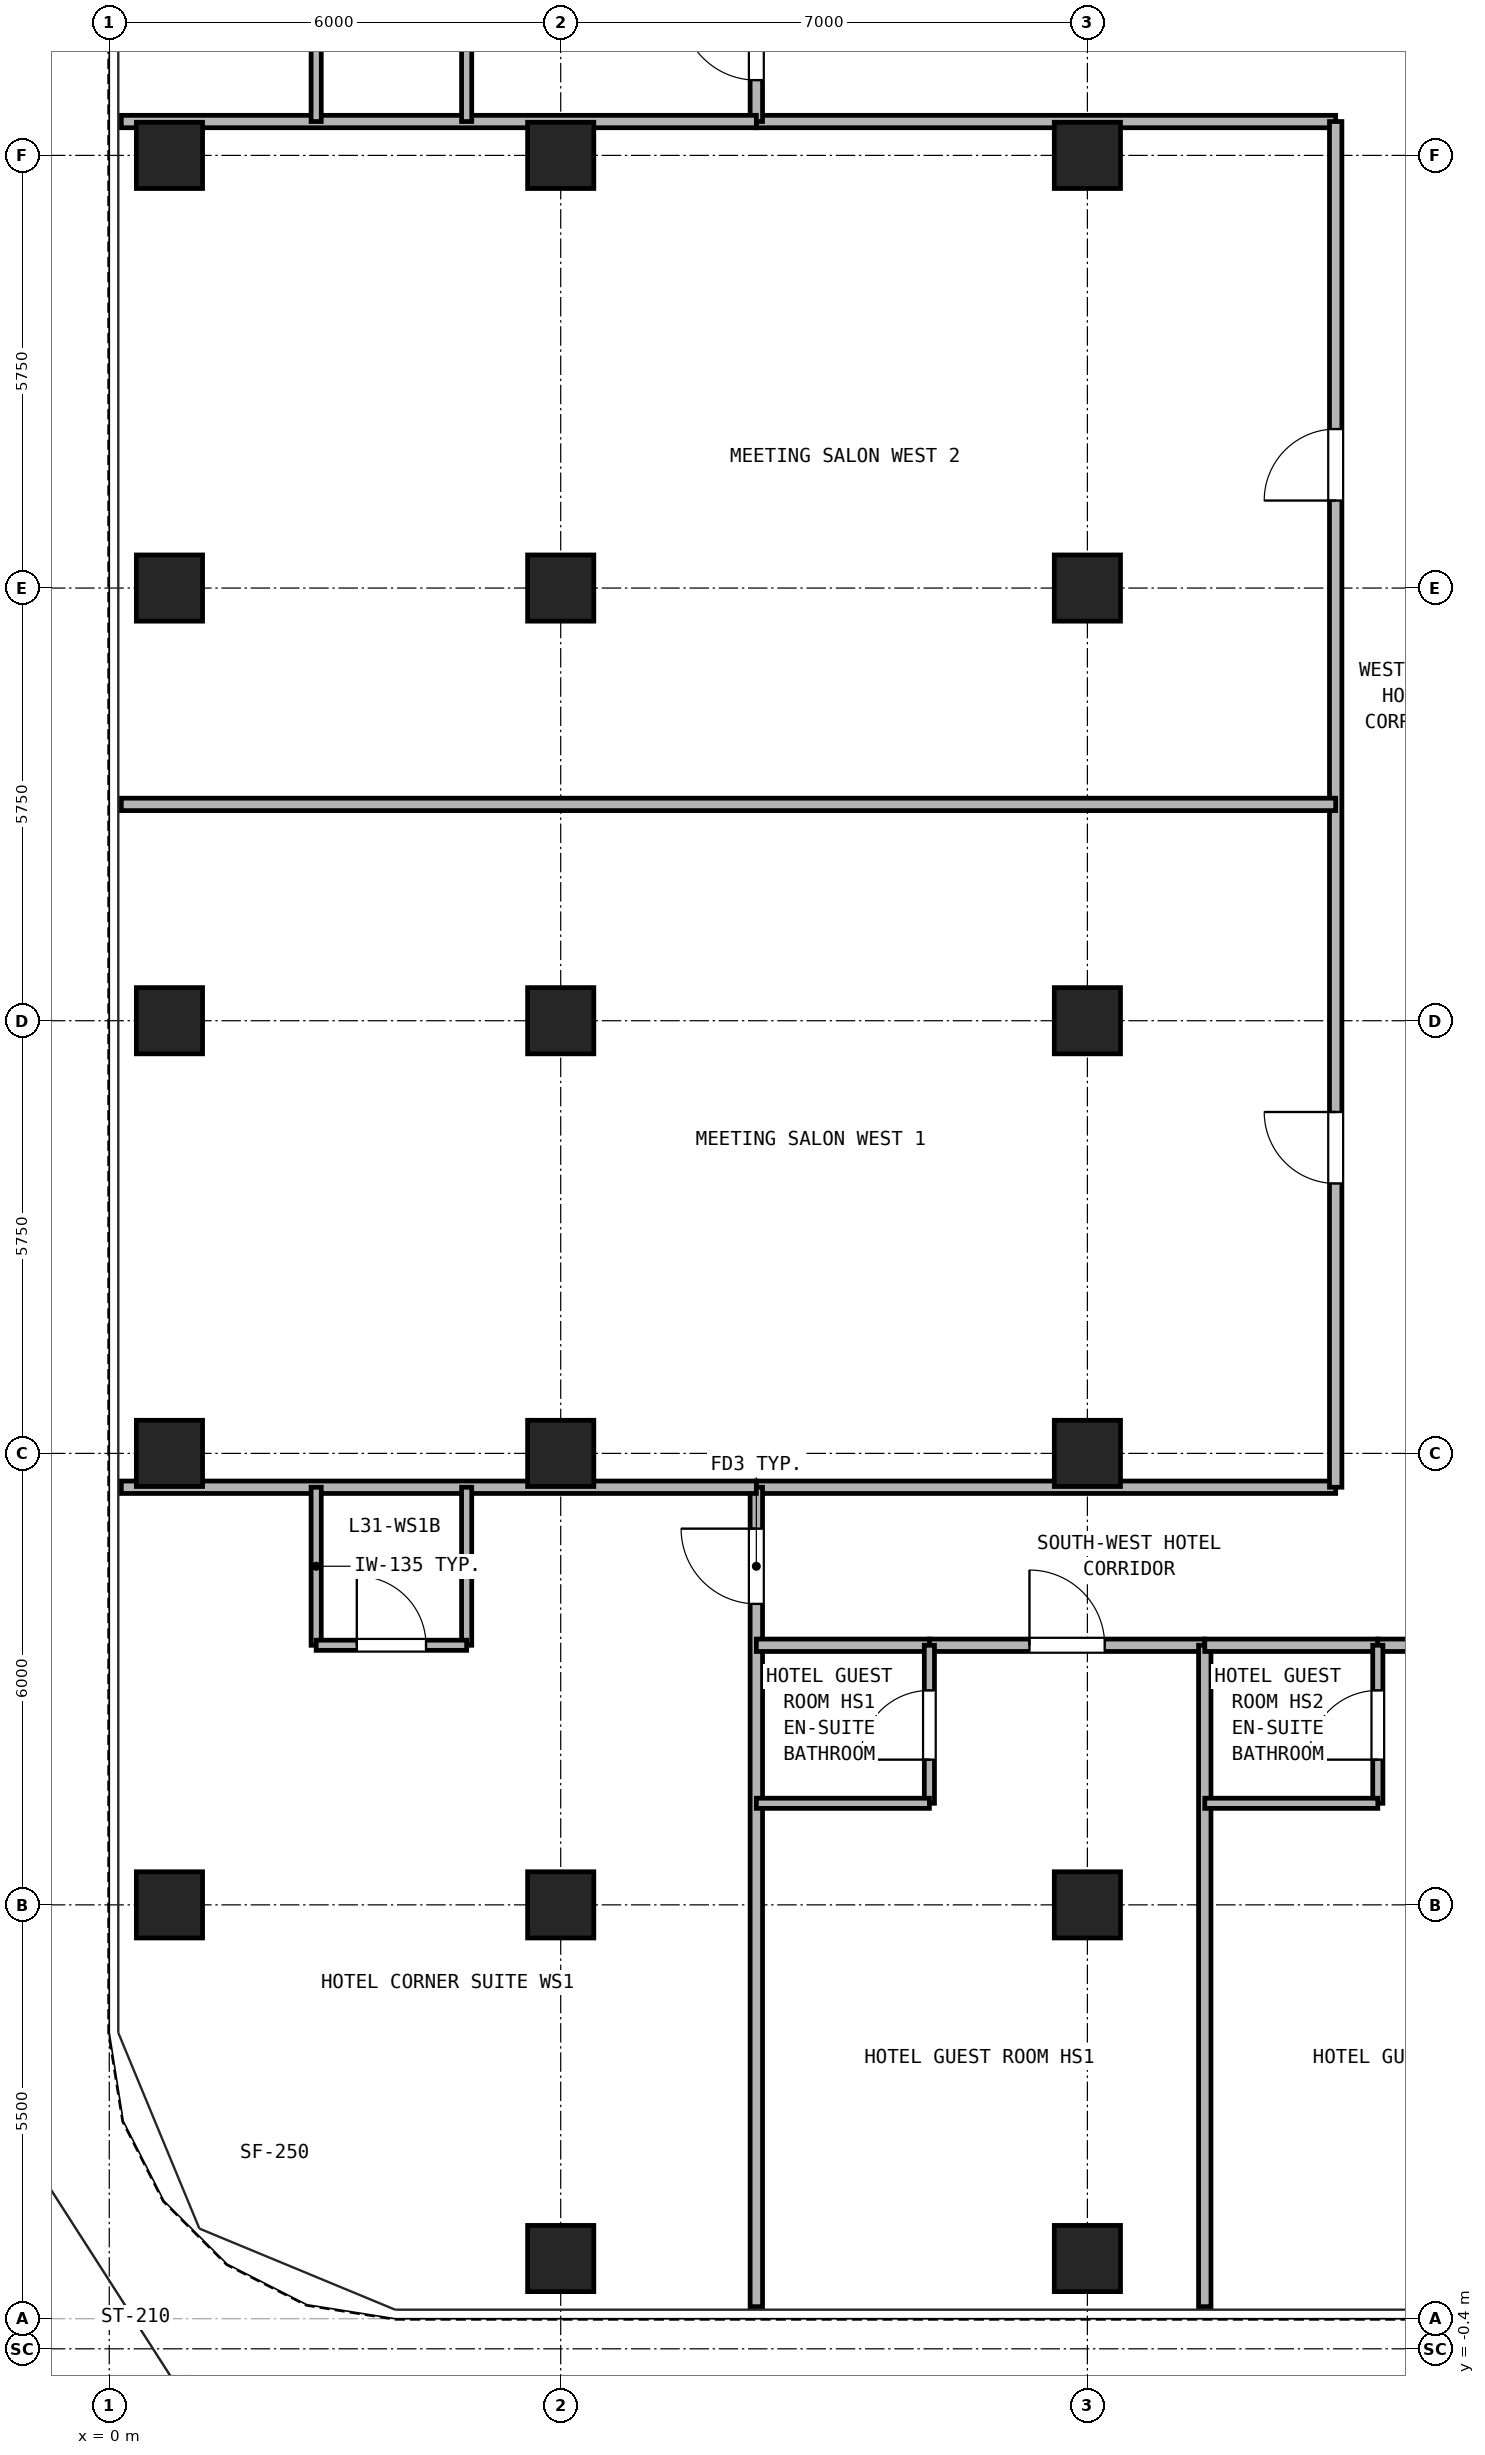
"""IFC4 building model, lengths in metres.
Left out: names, types, materials, properties, quantities, classifications, styles, units other than length and angle.
Written with IfcOpenShell. Run it as: python <this file> out.ifc"""

import sys

from ifc_helpers import new_model, si_unit, direction, frame, frame_2d, origin, origin_2d, place, context, subcontext, project, spatial, rectangle, hollow_rectangle, extrude, source, transform, mapped, element, fill, save


model = new_model("IFC4")
c1 = context("Model", 3, precision=1e-05, world=origin(), true_north=direction((0.0, 1.0)))
c2 = subcontext(c1, "Body", "Model", "MODEL_VIEW")
j1 = project(units=[si_unit("LENGTHUNIT", "METRE"), si_unit("PLANEANGLEUNIT", "RADIAN")], contexts=[c1])
p1 = place(None, origin())
s1 = spatial("IfcSite", under=j1, at=p1, CompositionType="ELEMENT")
p2 = place(p1, origin())
s2 = spatial("IfcBuilding", under=s1, at=p2, CompositionType="ELEMENT")
p3 = place(p2, frame((0.0, 0.0, 115.1)))
s3 = spatial("IfcBuildingStorey", under=s2, at=p3, CompositionType="ELEMENT", Elevation=115.1)
m1 = source(origin(), c2, "Body", "SweptSolid", [
    extrude(hollow_rectangle(XDim=0.88, YDim=0.88, WallThickness=0.05, at=origin_2d()), origin(), (0.0, 0.0, 1.0), 2.95),
])
for number, where, z_axis, x_axis in (
    (1, (6.0, 0.8, 0.0), (0.0, 0.0, 1.0), (1.0, 0.0, 0.0)),
    (2, (13.0, 0.8, 0.0), (0.0, 0.0, 1.0), (1.0, 0.0, 0.0)),
    (3, (0.8, 5.5, 0.0), (0.0, 0.0, 1.0), (1.0, 0.0, 0.0)),
    (4, (0.8, 11.5, 0.0), (0.0, 0.0, 1.0), (1.0, 0.0, 0.0)),
    (5, (0.8, 17.25, 0.0), (0.0, 0.0, 1.0), (1.0, 0.0, 0.0)),
    (6, (0.8, 23.0, 0.0), (0.0, 0.0, 1.0), (1.0, 0.0, 0.0)),
    (7, (0.8, 28.75, 0.0), (0.0, 0.0, 1.0), (1.0, 0.0, 0.0)),
    (8, (6.0, 5.5, 0.0), (0.0, 0.0, 1.0), (1.0, 0.0, 0.0)),
    (9, (6.0, 11.5, 0.0), (0.0, 0.0, 1.0), (1.0, 0.0, 0.0)),
    (10, (6.0, 17.25, 0.0), (0.0, 0.0, 1.0), (1.0, 0.0, 0.0)),
    (11, (6.0, 23.0, 0.0), (0.0, 0.0, 1.0), (1.0, 0.0, 0.0)),
    (12, (6.0, 28.75, 0.0), (0.0, 0.0, 1.0), (1.0, 0.0, 0.0)),
    (13, (13.0, 5.5, 0.0), (0.0, 0.0, 1.0), (1.0, 0.0, 0.0)),
    (14, (13.0, 11.5, 0.0), (0.0, 0.0, 1.0), (1.0, 0.0, 0.0)),
    (15, (13.0, 17.25, 0.0), (0.0, 0.0, 1.0), (1.0, 0.0, 0.0)),
    (16, (13.0, 23.0, 0.0), (0.0, 0.0, 1.0), (1.0, 0.0, 0.0)),
    (17, (13.0, 28.75, 0.0), (0.0, 0.0, 1.0), (1.0, 0.0, 0.0)),
):
    element("IfcColumn", number, at=place(p3, frame(where, z_axis=z_axis, x_axis=x_axis)), inside=s3, PredefinedType="COLUMN", context=c2, shape_type="MappedRepresentation", body=[
        mapped(m1, transform((0.0, 0.0, 0.0), x_axis=(1.0, 0.0, 0.0), y_axis=(0.0, 1.0, 0.0), z_axis=(0.0, 0.0, 1.0), scale=1.0)),
    ])
for number, where, z_axis, x_axis in (
    (18, (8.6, 11.05, 0.0), (0.0, 0.0, 1.0), (1.0, 0.0, 0.0)),
    (19, (8.6, 29.2, 0.0), (0.0, 0.0, 1.0), (1.0, 0.0, 0.0)),
):
    element("IfcWall", number, at=place(p3, frame(where, z_axis=z_axis, x_axis=x_axis)), inside=s3, PredefinedType="PARTITIONING", context=c2, shape_type="SweptSolid", body=[
        extrude(rectangle(XDim=7.7, YDim=0.165, at=frame_2d((3.85, 0.0))), origin(), (0.0, 0.0, 1.0), 2.95),
    ])
p4 = place(p3, frame((16.3, 11.05, 0.0), z_axis=(0.0, 0.0, 1.0), x_axis=(0.0, 1.0, 0.0)))
e20 = element("IfcWall", 20, at=p4, inside=s3, PredefinedType="PARTITIONING", context=c2, shape_type="SweptSolid", body=[
    extrude(rectangle(XDim=18.15, YDim=0.165, at=frame_2d((9.075, 0.0))), origin(), (0.0, 0.0, 1.0), 2.95),
])
p5 = place(p4, frame((4.037, 0.0, 0.0)))
e21 = element("IfcOpeningElement", 21, at=p5, cuts=e20, PredefinedType="OPENING", context=c2, shape_type="SweptSolid", body=[
    extrude(rectangle(XDim=0.95, YDim=2.15, at=frame_2d((0.475, 1.075))), frame((0.0, 0.093, 0.0), z_axis=(0.0, -1.0, 0.0), x_axis=(1.0, 0.0, 0.0)), (0.0, 0.0, 1.0), 0.185),
])
p6 = place(p4, frame((13.113, 0.0, 0.0)))
e22 = element("IfcOpeningElement", 22, at=p6, cuts=e20, PredefinedType="OPENING", context=c2, shape_type="SweptSolid", body=[
    extrude(rectangle(XDim=0.95, YDim=2.15, at=frame_2d((0.475, 1.075))), frame((0.0, 0.093, 0.0), z_axis=(0.0, -1.0, 0.0), x_axis=(1.0, 0.0, 0.0)), (0.0, 0.0, 1.0), 0.185),
])
p7 = place(p3, frame((8.6, 0.16, 0.0), z_axis=(0.0, 0.0, 1.0), x_axis=(0.0, 1.0, 0.0)))
e23 = element("IfcWall", 23, at=p7, inside=s3, PredefinedType="PARTITIONING", context=c2, shape_type="SweptSolid", body=[
    extrude(rectangle(XDim=10.89, YDim=0.165, at=frame_2d((5.445, 0.0))), origin(), (0.0, 0.0, 1.0), 2.95),
])
p8 = place(p7, frame((9.34, 0.0, 0.0)))
e24 = element("IfcOpeningElement", 24, at=p8, cuts=e23, PredefinedType="OPENING", context=c2, shape_type="SweptSolid", body=[
    extrude(rectangle(XDim=1.0, YDim=2.15, at=frame_2d((0.5, 1.075))), frame((0.0, 0.093, 0.0), z_axis=(0.0, -1.0, 0.0), x_axis=(1.0, 0.0, 0.0)), (0.0, 0.0, 1.0), 0.185),
])
p9 = place(p3, frame((8.6, 29.2, 0.0), z_axis=(0.0, 0.0, 1.0), x_axis=(0.0, 1.0, 0.0)))
e25 = element("IfcWall", 25, at=p9, inside=s3, PredefinedType="PARTITIONING", context=c2, shape_type="SweptSolid", body=[
    extrude(rectangle(XDim=5.94, YDim=0.165, at=frame_2d((2.97, 0.0))), origin(), (0.0, 0.0, 1.0), 2.95),
])
p10 = place(p9, frame((0.55, 0.0, 0.0)))
e26 = element("IfcOpeningElement", 26, at=p10, cuts=e25, PredefinedType="OPENING", context=c2, shape_type="SweptSolid", body=[
    extrude(rectangle(XDim=1.0, YDim=2.15, at=frame_2d((0.5, 1.075))), frame((0.0, 0.093, 0.0), z_axis=(0.0, -1.0, 0.0), x_axis=(1.0, 0.0, 0.0)), (0.0, 0.0, 1.0), 0.185),
])
for number, where, z_axis, x_axis in (
    (27, (0.16, 11.05, 0.0), (0.0, 0.0, 1.0), (1.0, 0.0, 0.0)),
    (28, (0.16, 29.2, 0.0), (0.0, 0.0, 1.0), (1.0, 0.0, 0.0)),
):
    element("IfcWall", number, at=place(p3, frame(where, z_axis=z_axis, x_axis=x_axis)), inside=s3, PredefinedType="PARTITIONING", context=c2, shape_type="SweptSolid", body=[
        extrude(rectangle(XDim=8.44, YDim=0.165, at=frame_2d((4.22, 0.0))), origin(), (0.0, 0.0, 1.0), 2.95),
    ])
for number, where, z_axis, x_axis in (
    (29, (2.75, 8.95, 0.0), (0.0, 0.0, 1.0), (0.0, 1.0, 0.0)),
    (30, (4.75, 8.95, 0.0), (0.0, 0.0, 1.0), (0.0, 1.0, 0.0)),
):
    element("IfcWall", number, at=place(p3, frame(where, z_axis=z_axis, x_axis=x_axis)), inside=s3, PredefinedType="PARTITIONING", context=c2, shape_type="SweptSolid", body=[
        extrude(rectangle(XDim=2.1, YDim=0.135, at=frame_2d((1.05, 0.0))), origin(), (0.0, 0.0, 1.0), 2.95),
    ])
p11 = place(p3, frame((2.75, 8.95, 0.0), z_axis=(0.0, 0.0, 1.0), x_axis=(1.0, 0.0, 0.0)))
e31 = element("IfcWall", 31, at=p11, inside=s3, PredefinedType="PARTITIONING", context=c2, shape_type="SweptSolid", body=[
    extrude(rectangle(XDim=2.0, YDim=0.135, at=frame_2d((1.0, 0.0))), origin(), (0.0, 0.0, 1.0), 2.95),
])
p12 = place(p11, frame((0.54, 0.0, 0.0)))
e32 = element("IfcOpeningElement", 32, at=p12, cuts=e31, PredefinedType="OPENING", context=c2, shape_type="SweptSolid", body=[
    extrude(rectangle(XDim=0.92, YDim=2.1, at=frame_2d((0.46, 1.05))), frame((0.0, 0.077, 0.0), z_axis=(0.0, -1.0, 0.0), x_axis=(1.0, 0.0, 0.0)), (0.0, 0.0, 1.0), 0.155),
])
for number, where, z_axis, x_axis in (
    (33, (2.75, 29.2, 0.0), (0.0, 0.0, 1.0), (0.0, 1.0, 0.0)),
    (34, (4.75, 29.2, 0.0), (0.0, 0.0, 1.0), (0.0, 1.0, 0.0)),
):
    element("IfcWall", number, at=place(p3, frame(where, z_axis=z_axis, x_axis=x_axis)), inside=s3, PredefinedType="PARTITIONING", context=c2, shape_type="SweptSolid", body=[
        extrude(rectangle(XDim=2.1, YDim=0.135, at=frame_2d((1.05, 0.0))), origin(), (0.0, 0.0, 1.0), 2.95),
    ])
p13 = place(p3, frame((8.6, 8.95, 0.0), z_axis=(0.0, 0.0, 1.0), x_axis=(1.0, 0.0, 0.0)))
e35 = element("IfcWall", 35, at=p13, inside=s3, PredefinedType="PARTITIONING", context=c2, shape_type="SweptSolid", body=[
    extrude(rectangle(XDim=2.3, YDim=0.165, at=frame_2d((1.15, 0.0))), origin(), (0.0, 0.0, 1.0), 2.95),
])
p14 = place(p3, frame((10.9, 8.95, 0.0), z_axis=(0.0, 0.0, 1.0), x_axis=(1.0, 0.0, 0.0)))
e36 = element("IfcWall", 36, at=p14, inside=s3, PredefinedType="PARTITIONING", context=c2, shape_type="SweptSolid", body=[
    extrude(rectangle(XDim=3.66, YDim=0.165, at=frame_2d((1.83, 0.0))), origin(), (0.0, 0.0, 1.0), 2.95),
])
p15 = place(p14, frame((1.33, 0.0, 0.0)))
e37 = element("IfcOpeningElement", 37, at=p15, cuts=e36, PredefinedType="OPENING", context=c2, shape_type="SweptSolid", body=[
    extrude(rectangle(XDim=1.0, YDim=2.15, at=frame_2d((0.5, 1.075))), frame((0.0, 0.093, 0.0), z_axis=(0.0, -1.0, 0.0), x_axis=(1.0, 0.0, 0.0)), (0.0, 0.0, 1.0), 0.185),
])
p16 = place(p3, frame((10.9, 6.85, 0.0), z_axis=(0.0, 0.0, 1.0), x_axis=(0.0, 1.0, 0.0)))
e38 = element("IfcWall", 38, at=p16, inside=s3, PredefinedType="PARTITIONING", context=c2, shape_type="SweptSolid", body=[
    extrude(rectangle(XDim=2.1, YDim=0.135, at=frame_2d((1.05, 0.0))), origin(), (0.0, 0.0, 1.0), 2.95),
])
p17 = place(p16, frame((0.58, 0.0, 0.0)))
e39 = element("IfcOpeningElement", 39, at=p17, cuts=e38, PredefinedType="OPENING", context=c2, shape_type="SweptSolid", body=[
    extrude(rectangle(XDim=0.92, YDim=2.1, at=frame_2d((0.46, 1.05))), frame((0.0, 0.077, 0.0), z_axis=(0.0, -1.0, 0.0), x_axis=(1.0, 0.0, 0.0)), (0.0, 0.0, 1.0), 0.155),
])
p18 = place(p3, frame((8.6, 6.85, 0.0), z_axis=(0.0, 0.0, 1.0), x_axis=(1.0, 0.0, 0.0)))
e40 = element("IfcWall", 40, at=p18, inside=s3, PredefinedType="PARTITIONING", context=c2, shape_type="SweptSolid", body=[
    extrude(rectangle(XDim=2.3, YDim=0.135, at=frame_2d((1.15, 0.0))), origin(), (0.0, 0.0, 1.0), 2.95),
])
p19 = place(p3, frame((14.56, 0.16, 0.0), z_axis=(0.0, 0.0, 1.0), x_axis=(0.0, 1.0, 0.0)))
e41 = element("IfcWall", 41, at=p19, inside=s3, PredefinedType="PARTITIONING", context=c2, shape_type="SweptSolid", body=[
    extrude(rectangle(XDim=8.79, YDim=0.165, at=frame_2d((4.395, 0.0))), origin(), (0.0, 0.0, 1.0), 2.95),
])
p20 = place(p3, frame((14.56, 8.95, 0.0), z_axis=(0.0, 0.0, 1.0), x_axis=(1.0, 0.0, 0.0)))
e42 = element("IfcWall", 42, at=p20, inside=s3, PredefinedType="PARTITIONING", context=c2, shape_type="SweptSolid", body=[
    extrude(rectangle(XDim=2.3, YDim=0.165, at=frame_2d((1.15, 0.0))), origin(), (0.0, 0.0, 1.0), 2.95),
])
p21 = place(p3, frame((16.86, 8.95, 0.0), z_axis=(0.0, 0.0, 1.0), x_axis=(1.0, 0.0, 0.0)))
e43 = element("IfcWall", 43, at=p21, inside=s3, PredefinedType="PARTITIONING", context=c2, shape_type="SweptSolid", body=[
    extrude(rectangle(XDim=3.66, YDim=0.165, at=frame_2d((1.83, 0.0))), origin(), (0.0, 0.0, 1.0), 2.95),
])
p22 = place(p21, frame((1.33, 0.0, 0.0)))
e44 = element("IfcOpeningElement", 44, at=p22, cuts=e43, PredefinedType="OPENING", context=c2, shape_type="SweptSolid", body=[
    extrude(rectangle(XDim=1.0, YDim=2.15, at=frame_2d((0.5, 1.075))), frame((0.0, 0.093, 0.0), z_axis=(0.0, -1.0, 0.0), x_axis=(1.0, 0.0, 0.0)), (0.0, 0.0, 1.0), 0.185),
])
p23 = place(p3, frame((16.86, 6.85, 0.0), z_axis=(0.0, 0.0, 1.0), x_axis=(0.0, 1.0, 0.0)))
e45 = element("IfcWall", 45, at=p23, inside=s3, PredefinedType="PARTITIONING", context=c2, shape_type="SweptSolid", body=[
    extrude(rectangle(XDim=2.1, YDim=0.135, at=frame_2d((1.05, 0.0))), origin(), (0.0, 0.0, 1.0), 2.95),
])
p24 = place(p23, frame((0.58, 0.0, 0.0)))
e46 = element("IfcOpeningElement", 46, at=p24, cuts=e45, PredefinedType="OPENING", context=c2, shape_type="SweptSolid", body=[
    extrude(rectangle(XDim=0.92, YDim=2.1, at=frame_2d((0.46, 1.05))), frame((0.0, 0.077, 0.0), z_axis=(0.0, -1.0, 0.0), x_axis=(1.0, 0.0, 0.0)), (0.0, 0.0, 1.0), 0.155),
])
p25 = place(p3, frame((14.56, 6.85, 0.0), z_axis=(0.0, 0.0, 1.0), x_axis=(1.0, 0.0, 0.0)))
e47 = element("IfcWall", 47, at=p25, inside=s3, PredefinedType="PARTITIONING", context=c2, shape_type="SweptSolid", body=[
    extrude(rectangle(XDim=2.3, YDim=0.135, at=frame_2d((1.15, 0.0))), origin(), (0.0, 0.0, 1.0), 2.95),
])
p26 = place(p3, frame((0.16, 20.125, 0.0), z_axis=(0.0, 0.0, 1.0), x_axis=(1.0, 0.0, 0.0)))
e48 = element("IfcWall", 48, at=p26, inside=s3, PredefinedType="PARTITIONING", context=c2, shape_type="SweptSolid", body=[
    extrude(rectangle(XDim=16.14, YDim=0.165, at=frame_2d((8.07, 0.0))), origin(), (0.0, 0.0, 1.0), 2.583),
])
p27 = place(p12, origin())
e49 = element("IfcDoor", 49, at=p27, inside=s3, OperationType="SINGLE_SWING_LEFT", PredefinedType="DOOR", context=c2, shape_type="SweptSolid", body=[
    extrude(rectangle(XDim=0.92, YDim=2.1, at=frame_2d((0.46, 1.05))), frame((0.0, 0.025, 0.0), z_axis=(0.0, -1.0, 0.0), x_axis=(1.0, 0.0, 0.0)), (0.0, 0.0, 1.0), 0.05),
])
fill(e32, e49)
p28 = place(p8, origin())
e50 = element("IfcDoor", 50, at=p28, inside=s3, OperationType="SINGLE_SWING_RIGHT", PredefinedType="DOOR", context=c2, shape_type="SweptSolid", body=[
    extrude(rectangle(XDim=1.0, YDim=2.15, at=frame_2d((0.5, 1.075))), frame((0.0, 0.025, 0.0), z_axis=(0.0, -1.0, 0.0), x_axis=(1.0, 0.0, 0.0)), (0.0, 0.0, 1.0), 0.05),
])
fill(e24, e50)
p29 = place(p10, origin())
e51 = element("IfcDoor", 51, at=p29, inside=s3, OperationType="SINGLE_SWING_RIGHT", PredefinedType="DOOR", context=c2, shape_type="SweptSolid", body=[
    extrude(rectangle(XDim=1.0, YDim=2.15, at=frame_2d((0.5, 1.075))), frame((0.0, 0.025, 0.0), z_axis=(0.0, -1.0, 0.0), x_axis=(1.0, 0.0, 0.0)), (0.0, 0.0, 1.0), 0.05),
])
fill(e26, e51)
p30 = place(p17, frame((0.92, 0.0, 0.0), z_axis=(0.0, 0.0, 1.0), x_axis=(-1.0, 0.0, 0.0)))
e52 = element("IfcDoor", 52, at=p30, inside=s3, OperationType="SINGLE_SWING_LEFT", PredefinedType="DOOR", context=c2, shape_type="SweptSolid", body=[
    extrude(rectangle(XDim=0.92, YDim=2.1, at=frame_2d((0.46, 1.05))), frame((0.0, 0.025, 0.0), z_axis=(0.0, -1.0, 0.0), x_axis=(1.0, 0.0, 0.0)), (0.0, 0.0, 1.0), 0.05),
])
fill(e39, e52)
p31 = place(p15, frame((1.0, 0.0, 0.0), z_axis=(0.0, 0.0, 1.0), x_axis=(-1.0, 0.0, 0.0)))
e53 = element("IfcDoor", 53, at=p31, inside=s3, OperationType="SINGLE_SWING_LEFT", PredefinedType="DOOR", context=c2, shape_type="SweptSolid", body=[
    extrude(rectangle(XDim=1.0, YDim=2.15, at=frame_2d((0.5, 1.075))), frame((0.0, 0.025, 0.0), z_axis=(0.0, -1.0, 0.0), x_axis=(1.0, 0.0, 0.0)), (0.0, 0.0, 1.0), 0.05),
])
fill(e37, e53)
p32 = place(p24, frame((0.92, 0.0, 0.0), z_axis=(0.0, 0.0, 1.0), x_axis=(-1.0, 0.0, 0.0)))
e54 = element("IfcDoor", 54, at=p32, inside=s3, OperationType="SINGLE_SWING_LEFT", PredefinedType="DOOR", context=c2, shape_type="SweptSolid", body=[
    extrude(rectangle(XDim=0.92, YDim=2.1, at=frame_2d((0.46, 1.05))), frame((0.0, 0.025, 0.0), z_axis=(0.0, -1.0, 0.0), x_axis=(1.0, 0.0, 0.0)), (0.0, 0.0, 1.0), 0.05),
])
fill(e46, e54)
p33 = place(p5, frame((0.95, 0.0, 0.0), z_axis=(0.0, 0.0, 1.0), x_axis=(-1.0, 0.0, 0.0)))
e55 = element("IfcDoor", 55, at=p33, inside=s3, OperationType="SINGLE_SWING_RIGHT", PredefinedType="DOOR", context=c2, shape_type="SweptSolid", body=[
    extrude(rectangle(XDim=0.95, YDim=2.15, at=frame_2d((0.475, 1.075))), frame((0.0, 0.025, 0.0), z_axis=(0.0, -1.0, 0.0), x_axis=(1.0, 0.0, 0.0)), (0.0, 0.0, 1.0), 0.05),
])
fill(e21, e55)
p34 = place(p6, frame((0.95, 0.0, 0.0), z_axis=(0.0, 0.0, 1.0), x_axis=(-1.0, 0.0, 0.0)))
e56 = element("IfcDoor", 56, at=p34, inside=s3, OperationType="SINGLE_SWING_LEFT", PredefinedType="DOOR", context=c2, shape_type="SweptSolid", body=[
    extrude(rectangle(XDim=0.95, YDim=2.15, at=frame_2d((0.475, 1.075))), frame((0.0, 0.025, 0.0), z_axis=(0.0, -1.0, 0.0), x_axis=(1.0, 0.0, 0.0)), (0.0, 0.0, 1.0), 0.05),
])
fill(e22, e56)
save(model, sys.argv[1])
